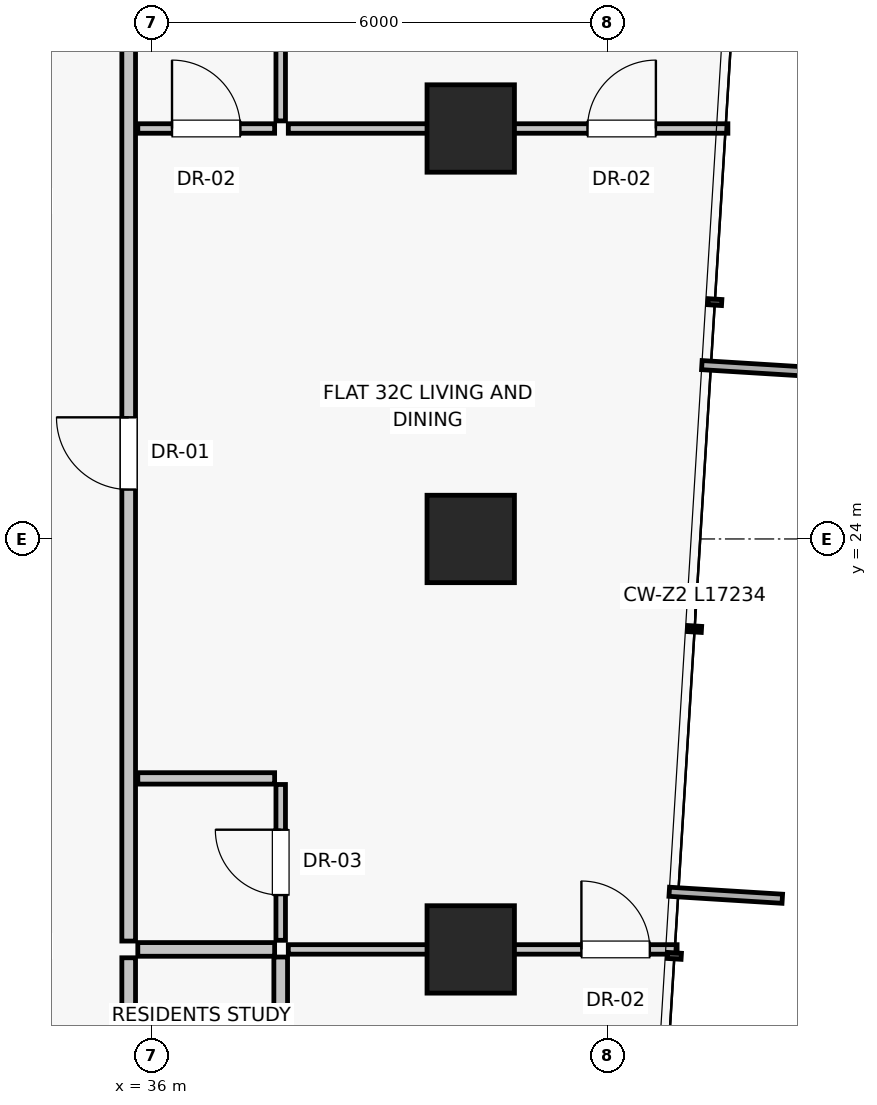
"""IFC4 building model, lengths in metres.
Left out: names, types, materials, properties, quantities, classifications, styles, units other than length and angle.
Written with IfcOpenShell. Run it as: python <this file> out.ifc"""

import sys

from ifc_helpers import new_model, si_unit, direction, frame, frame_2d, origin, origin_2d, place, context, subcontext, project, spatial, rectangle, extrude, source, transform, mapped, element, fill, save


model = new_model("IFC4")
c1 = context("Model", 3, precision=1e-05, world=origin(), true_north=direction((0.0, 1.0)))
c2 = subcontext(c1, "Body", "Model", "MODEL_VIEW")
j1 = project(units=[si_unit("LENGTHUNIT", "METRE"), si_unit("PLANEANGLEUNIT", "RADIAN")], contexts=[c1])
p1 = place(None, origin())
s1 = spatial("IfcSite", under=j1, at=p1, CompositionType="ELEMENT")
p2 = place(p1, origin())
s2 = spatial("IfcBuilding", under=s1, at=p2, CompositionType="ELEMENT")
p3 = place(p2, frame((0.0, 0.0, 116.5)))
s3 = spatial("IfcBuildingStorey", under=s2, at=p3, CompositionType="ELEMENT", Elevation=116.5)
for number, where, z_axis, x_axis in (
    (1, (40.2, 18.6, 0.0), (0.0, 0.0, 1.0), (1.0, 0.0, 0.0)),
    (2, (40.2, 24.0, 0.0), (0.0, 0.0, 1.0), (1.0, 0.0, 0.0)),
    (3, (40.2, 29.4, 0.0), (0.0, 0.0, 1.0), (1.0, 0.0, 0.0)),
):
    element("IfcColumn", number, at=place(p3, frame(where, z_axis=z_axis, x_axis=x_axis)), inside=s3, PredefinedType="COLUMN", context=c2, shape_type="SweptSolid", body=[
        extrude(rectangle(XDim=1.15, YDim=1.15, at=origin_2d()), origin(), (0.0, 0.0, 1.0), 3.25),
    ])
p4 = place(p3, frame((35.7, 12.21, 0.0), z_axis=(0.0, 0.0, 1.0), x_axis=(0.0, 1.0, 0.0)))
e4 = element("IfcWall", 4, at=p4, inside=s3, PredefinedType="PARTITIONING", context=c2, shape_type="SweptSolid", body=[
    extrude(rectangle(XDim=6.28, YDim=0.18, at=frame_2d((3.14, 0.0))), origin(), (0.0, 0.0, 1.0), 2.58),
])
p5 = place(p4, frame((2.64, 0.0, 0.0)))
e5 = element("IfcOpeningElement", 5, at=p5, cuts=e4, PredefinedType="OPENING", context=c2, shape_type="SweptSolid", body=[
    extrude(rectangle(XDim=1.0, YDim=2.01, at=frame_2d((0.5, 1.005))), frame((0.0, 0.1, 0.0), z_axis=(0.0, -1.0, 0.0), x_axis=(1.0, 0.0, 0.0)), (0.0, 0.0, 1.0), 0.2),
])
p6 = place(p3, frame((35.7, 18.71, 0.0), z_axis=(0.0, 0.0, 1.0), x_axis=(0.0, 1.0, 0.0)))
e6 = element("IfcWall", 6, at=p6, inside=s3, PredefinedType="PARTITIONING", context=c2, shape_type="SweptSolid", body=[
    extrude(rectangle(XDim=16.88, YDim=0.18, at=frame_2d((8.44, 0.0))), origin(), (0.0, 0.0, 1.0), 2.58),
])
p7 = place(p6, frame((5.94, 0.0, 0.0)))
e7 = element("IfcOpeningElement", 7, at=p7, cuts=e6, PredefinedType="OPENING", context=c2, shape_type="SweptSolid", body=[
    extrude(rectangle(XDim=0.95, YDim=2.02, at=frame_2d((0.475, 1.01))), frame((0.0, 0.1, 0.0), z_axis=(0.0, -1.0, 0.0), x_axis=(1.0, 0.0, 0.0)), (0.0, 0.0, 1.0), 0.2),
])
p8 = place(p3, frame((37.7, 12.22, 0.0), z_axis=(0.0, 0.0, 1.0), x_axis=(0.0, 1.0, 0.0)))
e8 = element("IfcWall", 8, at=p8, inside=s3, PredefinedType="PARTITIONING", context=c2, shape_type="SweptSolid", body=[
    extrude(rectangle(XDim=6.28, YDim=0.18, at=frame_2d((3.14, 0.0))), origin(), (0.0, 0.0, 1.0), 3.0),
])
p9 = place(p3, frame((35.82, 18.6, 0.0), z_axis=(0.0, 0.0, 1.0), x_axis=(1.0, 0.0, 0.0)))
e9 = element("IfcWall", 9, at=p9, inside=s3, PredefinedType="PARTITIONING", context=c2, shape_type="SweptSolid", body=[
    extrude(rectangle(XDim=1.8, YDim=0.18, at=frame_2d((0.9, 0.0))), origin(), (0.0, 0.0, 1.0), 2.378),
])
p10 = place(p3, frame((37.8, 18.6, 0.0), z_axis=(0.0, 0.0, 1.0), x_axis=(1.0, 0.0, 0.0)))
e10 = element("IfcWall", 10, at=p10, inside=s3, PredefinedType="PARTITIONING", context=c2, shape_type="SweptSolid", body=[
    extrude(rectangle(XDim=5.115, YDim=0.125, at=frame_2d((2.558, 0.0))), origin(), (0.0, 0.0, 1.0), 2.378),
])
p11 = place(p10, frame((3.856, 0.0, 0.0)))
e11 = element("IfcOpeningElement", 11, at=p11, cuts=e10, PredefinedType="OPENING", context=c2, shape_type="SweptSolid", body=[
    extrude(rectangle(XDim=0.9, YDim=2.01, at=frame_2d((0.45, 1.005))), frame((0.0, 0.073, 0.0), z_axis=(0.0, -1.0, 0.0), x_axis=(1.0, 0.0, 0.0)), (0.0, 0.0, 1.0), 0.145),
])
p12 = place(p3, frame((35.82, 20.85, 0.0), z_axis=(0.0, 0.0, 1.0), x_axis=(1.0, 0.0, 0.0)))
e12 = element("IfcWall", 12, at=p12, inside=s3, PredefinedType="PARTITIONING", context=c2, shape_type="SweptSolid", body=[
    extrude(rectangle(XDim=1.8, YDim=0.15, at=frame_2d((0.9, 0.0))), origin(), (0.0, 0.0, 1.0), 3.0),
])
p13 = place(p3, frame((37.7, 18.72, 0.0), z_axis=(0.0, 0.0, 1.0), x_axis=(0.0, 1.0, 0.0)))
e13 = element("IfcWall", 13, at=p13, inside=s3, PredefinedType="PARTITIONING", context=c2, shape_type="SweptSolid", body=[
    extrude(rectangle(XDim=2.05, YDim=0.125, at=frame_2d((1.025, 0.0))), origin(), (0.0, 0.0, 1.0), 3.0),
])
p14 = place(p13, frame((0.595, 0.0, 0.0)))
e14 = element("IfcOpeningElement", 14, at=p14, cuts=e13, PredefinedType="OPENING", context=c2, shape_type="SweptSolid", body=[
    extrude(rectangle(XDim=0.86, YDim=2.01, at=frame_2d((0.43, 1.005))), frame((0.0, 0.073, 0.0), z_axis=(0.0, -1.0, 0.0), x_axis=(1.0, 0.0, 0.0)), (0.0, 0.0, 1.0), 0.145),
])
p15 = place(p3, frame((35.82, 29.4, 0.0), z_axis=(0.0, 0.0, 1.0), x_axis=(1.0, 0.0, 0.0)))
e15 = element("IfcWall", 15, at=p15, inside=s3, PredefinedType="PARTITIONING", context=c2, shape_type="SweptSolid", body=[
    extrude(rectangle(XDim=1.8, YDim=0.125, at=frame_2d((0.9, 0.0))), origin(), (0.0, 0.0, 1.0), 2.378),
])
p16 = place(p15, frame((0.45, 0.0, 0.0)))
e16 = element("IfcOpeningElement", 16, at=p16, cuts=e15, PredefinedType="OPENING", context=c2, shape_type="SweptSolid", body=[
    extrude(rectangle(XDim=0.9, YDim=2.01, at=frame_2d((0.45, 1.005))), frame((0.0, 0.073, 0.0), z_axis=(0.0, -1.0, 0.0), x_axis=(1.0, 0.0, 0.0)), (0.0, 0.0, 1.0), 0.145),
])
p17 = place(p3, frame((37.7, 29.5, 0.0), z_axis=(0.0, 0.0, 1.0), x_axis=(0.0, 1.0, 0.0)))
e17 = element("IfcWall", 17, at=p17, inside=s3, PredefinedType="PARTITIONING", context=c2, shape_type="SweptSolid", body=[
    extrude(rectangle(XDim=6.08, YDim=0.125, at=frame_2d((3.04, 0.0))), origin(), (0.0, 0.0, 1.0), 3.0),
])
p18 = place(p3, frame((37.8, 29.4, 0.0), z_axis=(0.0, 0.0, 1.0), x_axis=(1.0, 0.0, 0.0)))
e18 = element("IfcWall", 18, at=p18, inside=s3, PredefinedType="PARTITIONING", context=c2, shape_type="SweptSolid", body=[
    extrude(rectangle(XDim=5.783, YDim=0.125, at=frame_2d((2.892, 0.0))), origin(), (0.0, 0.0, 1.0), 2.378),
])
p19 = place(p18, frame((3.936, 0.0, 0.0)))
e19 = element("IfcOpeningElement", 19, at=p19, cuts=e18, PredefinedType="OPENING", context=c2, shape_type="SweptSolid", body=[
    extrude(rectangle(XDim=0.9, YDim=2.01, at=frame_2d((0.45, 1.005))), frame((0.0, 0.073, 0.0), z_axis=(0.0, -1.0, 0.0), x_axis=(1.0, 0.0, 0.0)), (0.0, 0.0, 1.0), 0.145),
])
m1 = source(origin(), c2, "Body", "SweptSolid", [
    extrude(rectangle(XDim=0.95, YDim=2.02, at=frame_2d((0.475, 1.01))), frame((0.0, 0.025, 0.0), z_axis=(0.0, -1.0, 0.0), x_axis=(1.0, 0.0, 0.0)), (0.0, 0.0, 1.0), 0.05),
])
p20 = place(p7, origin())
e20 = element("IfcDoor", 20, at=p20, inside=s3, OperationType="SINGLE_SWING_RIGHT", PredefinedType="DOOR", context=c2, shape_type="MappedRepresentation", body=[
    mapped(m1, transform((0.0, 0.0, 0.0), scale=1.0)),
])
fill(e7, e20)
m2 = source(origin(), c2, "Body", "SweptSolid", [
    extrude(rectangle(XDim=0.9, YDim=2.01, at=frame_2d((0.45, 1.005))), frame((0.0, 0.025, 0.0), z_axis=(0.0, -1.0, 0.0), x_axis=(1.0, 0.0, 0.0)), (0.0, 0.0, 1.0), 0.05),
])
p21 = place(p11, origin())
e21 = element("IfcDoor", 21, at=p21, inside=s3, OperationType="SINGLE_SWING_LEFT", PredefinedType="DOOR", context=c2, shape_type="MappedRepresentation", body=[
    mapped(m2, transform((0.0, 0.0, 0.0), scale=1.0)),
])
fill(e11, e21)
m3 = source(origin(), c2, "Body", "SweptSolid", [
    extrude(rectangle(XDim=0.86, YDim=2.01, at=frame_2d((0.43, 1.005))), frame((0.0, 0.025, 0.0), z_axis=(0.0, -1.0, 0.0), x_axis=(1.0, 0.0, 0.0)), (0.0, 0.0, 1.0), 0.05),
])
p22 = place(p14, origin())
e22 = element("IfcDoor", 22, at=p22, inside=s3, OperationType="SINGLE_SWING_RIGHT", PredefinedType="DOOR", context=c2, shape_type="MappedRepresentation", body=[
    mapped(m3, transform((0.0, 0.0, 0.0), scale=1.0)),
])
fill(e14, e22)
p23 = place(p16, origin())
e23 = element("IfcDoor", 23, at=p23, inside=s3, OperationType="SINGLE_SWING_LEFT", PredefinedType="DOOR", context=c2, shape_type="MappedRepresentation", body=[
    mapped(m2, transform((0.0, 0.0, 0.0), scale=1.0)),
])
fill(e16, e23)
p24 = place(p19, origin())
e24 = element("IfcDoor", 24, at=p24, inside=s3, OperationType="SINGLE_SWING_RIGHT", PredefinedType="DOOR", context=c2, shape_type="MappedRepresentation", body=[
    mapped(m2, transform((0.0, 0.0, 0.0), scale=1.0)),
])
fill(e19, e24)
save(model, sys.argv[1])
